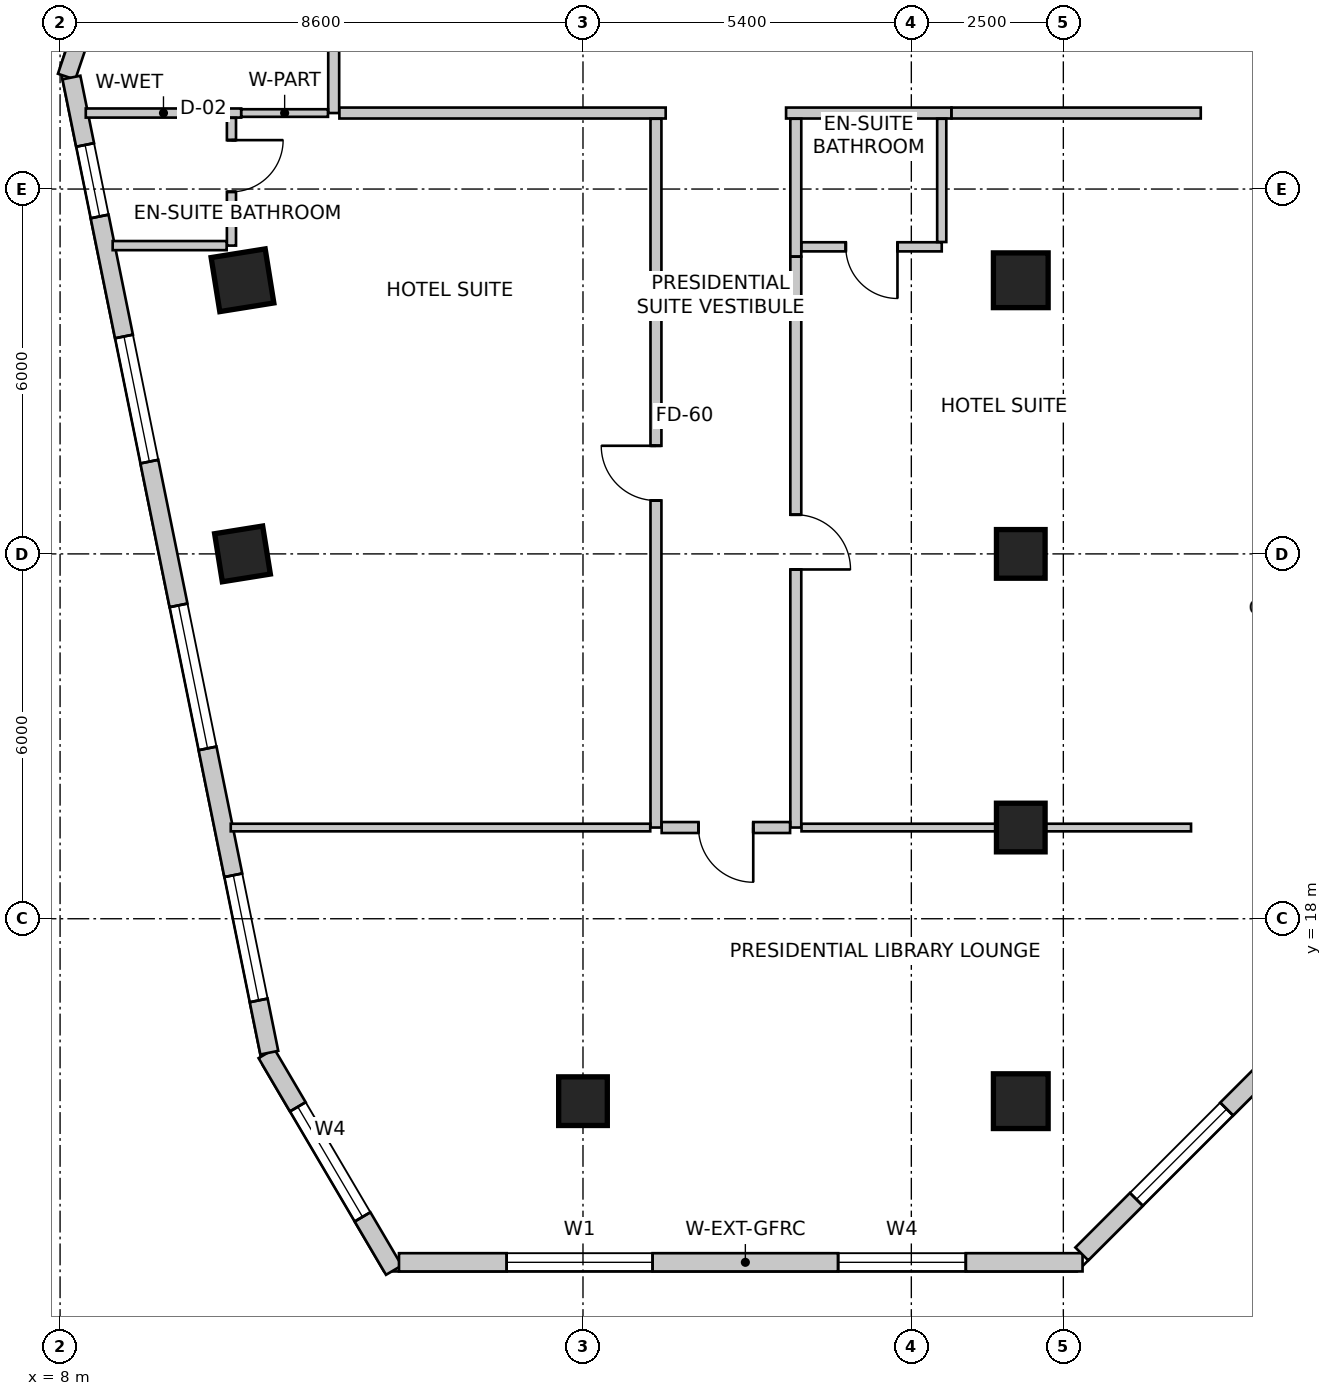
"""IFC4 building model, lengths in metres.
Left out: names, types, materials, properties, quantities, classifications, styles, units other than length and angle.
Written with IfcOpenShell. Run it as: python <this file> out.ifc"""

import sys

from ifc_helpers import new_model, si_unit, direction, frame, frame_2d, origin, origin_2d, place, context, subcontext, project, spatial, rectangle, extrude, source, transform, mapped, element, fill, save


model = new_model("IFC4")
c1 = context("Model", 3, precision=1e-05, world=origin(), true_north=direction((0.0, 1.0)))
c2 = subcontext(c1, "Body", "Model", "MODEL_VIEW")
j1 = project(units=[si_unit("LENGTHUNIT", "METRE"), si_unit("PLANEANGLEUNIT", "RADIAN")], contexts=[c1])
p1 = place(None, origin())
s1 = spatial("IfcSite", under=j1, at=p1, CompositionType="ELEMENT")
p2 = place(p1, origin())
s2 = spatial("IfcBuilding", under=s1, at=p2, CompositionType="ELEMENT")
p3 = place(p2, frame((0.0, 0.0, 168.2)))
s3 = spatial("IfcBuildingStorey", under=s2, at=p3, CompositionType="ELEMENT", Elevation=168.2)
m1 = source(origin(), c2, "Body", "SweptSolid", [
    extrude(rectangle(XDim=0.9, YDim=0.9, at=origin_2d()), origin(), (0.0, 0.0, 1.0), 3.6),
])
p4 = place(p3, frame((11.0, 28.5, 0.0), z_axis=(0.0, 0.0, 1.0), x_axis=(0.158158067254, -0.987413806751, 0.0)))
e1 = element("IfcColumn", 1, at=p4, inside=s3, PredefinedType="COLUMN", context=c2, shape_type="MappedRepresentation", body=[
    mapped(m1, transform((0.0, 0.0, 0.0), scale=1.0)),
])
m2 = source(origin(), c2, "Body", "SweptSolid", [
    extrude(rectangle(XDim=0.8, YDim=0.8, at=origin_2d()), origin(), (0.0, 0.0, 1.0), 3.6),
])
p5 = place(p3, frame((11.0, 24.0, 0.0), z_axis=(0.0, 0.0, 1.0), x_axis=(0.158158067254, -0.987413806751, 0.0)))
e2 = element("IfcColumn", 2, at=p5, inside=s3, PredefinedType="COLUMN", context=c2, shape_type="MappedRepresentation", body=[
    mapped(m2, transform((0.0, 0.0, 0.0), scale=1.0)),
])
p6 = place(p3, frame((23.8, 28.5, 0.0), z_axis=(0.0, 0.0, 1.0), x_axis=(1.0, 0.0, 0.0)))
e3 = element("IfcColumn", 3, at=p6, inside=s3, PredefinedType="COLUMN", context=c2, shape_type="MappedRepresentation", body=[
    mapped(m1, transform((0.0, 0.0, 0.0), scale=1.0)),
])
for number, where, z_axis, x_axis in (
    (4, (23.8, 24.0, 0.0), (0.0, 0.0, 1.0), (1.0, 0.0, 0.0)),
    (5, (23.8, 19.5, 0.0), (0.0, 0.0, 1.0), (1.0, 0.0, 0.0)),
):
    element("IfcColumn", number, at=place(p3, frame(where, z_axis=z_axis, x_axis=x_axis)), inside=s3, PredefinedType="COLUMN", context=c2, shape_type="MappedRepresentation", body=[
        mapped(m2, transform((0.0, 0.0, 0.0), scale=1.0)),
    ])
p7 = place(p3, frame((23.8, 15.0, 0.0), z_axis=(0.0, 0.0, 1.0), x_axis=(1.0, 0.0, 0.0)))
e6 = element("IfcColumn", 6, at=p7, inside=s3, PredefinedType="COLUMN", context=c2, shape_type="MappedRepresentation", body=[
    mapped(m1, transform((0.0, 0.0, 0.0), scale=1.0)),
])
p8 = place(p3, frame((16.6, 15.0, 0.0), z_axis=(0.0, 0.0, 1.0), x_axis=(1.0, 0.0, 0.0)))
e7 = element("IfcColumn", 7, at=p8, inside=s3, PredefinedType="COLUMN", context=c2, shape_type="MappedRepresentation", body=[
    mapped(m2, transform((0.0, 0.0, 0.0), scale=1.0)),
])
p9 = place(p3, frame((11.394, 15.784, 0.0), z_axis=(0.0, 0.0, 1.0), x_axis=(0.50698915279, -0.861952434275, 0.0)))
e8 = element("IfcWall", 8, at=p9, inside=s3, PredefinedType="SOLIDWALL", context=c2, shape_type="SweptSolid", body=[
    extrude(rectangle(XDim=4.134, YDim=0.3, at=frame_2d((2.067, 0.0))), origin(), (0.0, 0.0, 1.0), 3.3),
])
m3 = source(origin(), c2, "Body", "SweptSolid", [
    extrude(rectangle(XDim=2.1, YDim=2.0, at=frame_2d((1.05, 1.0))), frame((0.0, 0.16, 0.0), z_axis=(0.0, -1.0, 0.0), x_axis=(1.0, 0.0, 0.0)), (0.0, 0.0, 1.0), 0.32),
])
p10 = place(p9, frame((1.017, 0.0, 0.85)))
e9 = element("IfcOpeningElement", 9, at=p10, cuts=e8, PredefinedType="OPENING", context=c2, shape_type="MappedRepresentation", body=[
    mapped(m3, transform((0.0, 0.0, 0.0), scale=1.0)),
])
p11 = place(p3, frame((13.574, 12.35, 0.0), z_axis=(0.0, 0.0, 1.0), x_axis=(1.0, 0.0, 0.0)))
e10 = element("IfcWall", 10, at=p11, inside=s3, PredefinedType="SOLIDWALL", context=c2, shape_type="SweptSolid", body=[
    extrude(rectangle(XDim=11.242, YDim=0.3, at=frame_2d((5.621, 0.0))), origin(), (0.0, 0.0, 1.0), 3.3),
])
m4 = source(origin(), c2, "Body", "SweptSolid", [
    extrude(rectangle(XDim=2.4, YDim=2.2, at=frame_2d((1.2, 1.1))), frame((0.0, 0.16, 0.0), z_axis=(0.0, -1.0, 0.0), x_axis=(1.0, 0.0, 0.0)), (0.0, 0.0, 1.0), 0.32),
])
p12 = place(p11, frame((1.771, 0.0, 0.85)))
e11 = element("IfcOpeningElement", 11, at=p12, cuts=e10, PredefinedType="OPENING", context=c2, shape_type="MappedRepresentation", body=[
    mapped(m4, transform((0.0, 0.0, 0.0), scale=1.0)),
])
p13 = place(p11, frame((7.222, 0.0, 0.85)))
e12 = element("IfcOpeningElement", 12, at=p13, cuts=e10, PredefinedType="OPENING", context=c2, shape_type="MappedRepresentation", body=[
    mapped(m3, transform((0.0, 0.0, 0.0), scale=1.0)),
])
p14 = place(p3, frame((24.804, 12.488, 0.0), z_axis=(0.0, 0.0, 1.0), x_axis=(0.70708046583, 0.707133095564, 0.0)))
e13 = element("IfcWall", 13, at=p14, inside=s3, PredefinedType="SOLIDWALL", context=c2, shape_type="SweptSolid", body=[
    extrude(rectangle(XDim=4.639, YDim=0.3, at=frame_2d((2.319, 0.0))), origin(), (0.0, 0.0, 1.0), 3.3),
])
p15 = place(p14, frame((1.269, 0.0, 0.85)))
e14 = element("IfcOpeningElement", 14, at=p15, cuts=e13, PredefinedType="OPENING", context=c2, shape_type="MappedRepresentation", body=[
    mapped(m3, transform((0.0, 0.0, 0.0), scale=1.0)),
])
p16 = place(p3, frame((13.269, 47.134, 0.0), z_axis=(0.0, 0.0, 1.0), x_axis=(-0.319929773322, -0.947441259468, 0.0)))
e15 = element("IfcWall", 15, at=p16, inside=s3, PredefinedType="SOLIDWALL", context=c2, shape_type="SweptSolid", body=[
    extrude(rectangle(XDim=16.134, YDim=0.3, at=frame_2d((8.067, 0.0))), origin(), (0.0, 0.0, 1.0), 3.3),
])
p17 = place(p16, frame((2.276, 0.0, 0.85)))
e16 = element("IfcOpeningElement", 16, at=p17, cuts=e15, PredefinedType="OPENING", context=c2, shape_type="MappedRepresentation", body=[
    mapped(m4, transform((0.0, 0.0, 0.0), scale=1.0)),
])
p18 = place(p16, frame((7.361, 0.0, 0.85)))
e17 = element("IfcOpeningElement", 17, at=p18, cuts=e15, PredefinedType="OPENING", context=c2, shape_type="MappedRepresentation", body=[
    mapped(m3, transform((0.0, 0.0, 0.0), scale=1.0)),
])
p19 = place(p16, frame((12.146, 0.0, 0.85)))
e18 = element("IfcOpeningElement", 18, at=p19, cuts=e15, PredefinedType="OPENING", context=c2, shape_type="MappedRepresentation", body=[
    mapped(m4, transform((0.0, 0.0, 0.0), scale=1.0)),
])
p20 = place(p3, frame((8.187, 31.834, 0.0), z_axis=(0.0, 0.0, 1.0), x_axis=(0.198869838988, -0.980025911464, 0.0)))
e19 = element("IfcWall", 19, at=p20, inside=s3, PredefinedType="SOLIDWALL", context=c2, shape_type="SweptSolid", body=[
    extrude(rectangle(XDim=16.363, YDim=0.3, at=frame_2d((8.182, 0.0))), origin(), (0.0, 0.0, 1.0), 3.3),
])
m5 = source(origin(), c2, "Body", "SweptSolid", [
    extrude(rectangle(XDim=1.2, YDim=1.6, at=frame_2d((0.6, 0.8))), frame((0.0, 0.16, 0.0), z_axis=(0.0, -1.0, 0.0), x_axis=(1.0, 0.0, 0.0)), (0.0, 0.0, 1.0), 0.32),
])
p21 = place(p20, frame((1.131, 0.0, 0.85)))
e20 = element("IfcOpeningElement", 20, at=p21, cuts=e19, PredefinedType="OPENING", context=c2, shape_type="MappedRepresentation", body=[
    mapped(m5, transform((0.0, 0.0, 0.0), scale=1.0)),
])
p22 = place(p20, frame((4.345, 0.0, 0.85)))
e21 = element("IfcOpeningElement", 21, at=p22, cuts=e19, PredefinedType="OPENING", context=c2, shape_type="MappedRepresentation", body=[
    mapped(m3, transform((0.0, 0.0, 0.0), scale=1.0)),
])
p23 = place(p20, frame((8.857, 0.0, 0.85)))
e22 = element("IfcOpeningElement", 22, at=p23, cuts=e19, PredefinedType="OPENING", context=c2, shape_type="MappedRepresentation", body=[
    mapped(m4, transform((0.0, 0.0, 0.0), scale=1.0)),
])
p24 = place(p20, frame((13.386, 0.0, 0.85)))
e23 = element("IfcOpeningElement", 23, at=p24, cuts=e19, PredefinedType="OPENING", context=c2, shape_type="MappedRepresentation", body=[
    mapped(m3, transform((0.0, 0.0, 0.0), scale=1.0)),
])
p25 = place(p3, frame((12.5, 31.25, 0.0), z_axis=(0.0, 0.0, 1.0), x_axis=(0.0, 1.0, 0.0)))
e24 = element("IfcWall", 24, at=p25, inside=s3, PredefinedType="PARTITIONING", context=c2, shape_type="SweptSolid", body=[
    extrude(rectangle(XDim=2.2, YDim=0.18, at=frame_2d((1.1, 0.0))), origin(), (0.0, 0.0, 1.0), 2.885),
])
p26 = place(p3, frame((17.96, 31.25, 0.0), z_axis=(0.0, 0.0, 1.0), x_axis=(-1.0, 0.0, 0.0)))
e25 = element("IfcWall", 25, at=p26, inside=s3, PredefinedType="PARTITIONING", context=c2, shape_type="SweptSolid", body=[
    extrude(rectangle(XDim=5.366, YDim=0.18, at=frame_2d((2.683, 0.0))), origin(), (0.0, 0.0, 1.0), 2.885),
])
p27 = place(p3, frame((22.66, 31.25, 0.0), z_axis=(0.0, 0.0, 1.0), x_axis=(-1.0, 0.0, 0.0)))
e26 = element("IfcWall", 26, at=p27, inside=s3, PredefinedType="PARTITIONING", context=c2, shape_type="SweptSolid", body=[
    extrude(rectangle(XDim=2.72, YDim=0.18, at=frame_2d((1.36, 0.0))), origin(), (0.0, 0.0, 1.0), 2.885),
])
p28 = place(p3, frame((26.76, 31.25, 0.0), z_axis=(0.0, 0.0, 1.0), x_axis=(-1.0, 0.0, 0.0)))
e27 = element("IfcWall", 27, at=p28, inside=s3, PredefinedType="PARTITIONING", context=c2, shape_type="SweptSolid", body=[
    extrude(rectangle(XDim=4.098, YDim=0.18, at=frame_2d((2.049, 0.0))), origin(), (0.0, 0.0, 1.0), 3.3),
])
p29 = place(p3, frame((10.979, 31.25, 0.0), z_axis=(0.0, 0.0, 1.0), x_axis=(-1.0, 0.0, 0.0)))
e28 = element("IfcWall", 28, at=p29, inside=s3, PredefinedType="PARTITIONING", context=c2, shape_type="SweptSolid", body=[
    extrude(rectangle(XDim=2.556, YDim=0.15, at=frame_2d((1.278, 0.0))), origin(), (0.0, 0.0, 1.0), 2.442),
])
p30 = place(p3, frame((12.406, 31.25, 0.0), z_axis=(0.0, 0.0, 1.0), x_axis=(-1.0, 0.0, 0.0)))
e29 = element("IfcWall", 29, at=p30, inside=s3, PredefinedType="PARTITIONING", context=c2, shape_type="SweptSolid", body=[
    extrude(rectangle(XDim=1.426, YDim=0.125, at=frame_2d((0.713, 0.0))), origin(), (0.0, 0.0, 1.0), 2.442),
])
p31 = place(p3, frame((17.8, 19.5, 0.0), z_axis=(0.0, 0.0, 1.0), x_axis=(0.0, 1.0, 0.0)))
e30 = element("IfcWall", 30, at=p31, inside=s3, PredefinedType="PARTITIONING", context=c2, shape_type="SweptSolid", body=[
    extrude(rectangle(XDim=11.656, YDim=0.18, at=frame_2d((5.828, 0.0))), origin(), (0.0, 0.0, 1.0), 2.738),
])
m6 = source(origin(), c2, "Body", "SweptSolid", [
    extrude(rectangle(XDim=0.9, YDim=2.15, at=frame_2d((0.45, 1.075))), frame((0.0, 0.1, 0.0), z_axis=(0.0, -1.0, 0.0), x_axis=(1.0, 0.0, 0.0)), (0.0, 0.0, 1.0), 0.2),
])
p32 = place(p31, frame((5.378, 0.0, 0.0)))
e31 = element("IfcOpeningElement", 31, at=p32, cuts=e30, PredefinedType="OPENING", context=c2, shape_type="MappedRepresentation", body=[
    mapped(m6, transform((0.0, 0.0, 0.0), scale=1.0)),
])
p33 = place(p3, frame((20.1, 31.156, 0.0), z_axis=(0.0, 0.0, 1.0), x_axis=(0.0, -1.0, 0.0)))
e32 = element("IfcWall", 32, at=p33, inside=s3, PredefinedType="PARTITIONING", context=c2, shape_type="SweptSolid", body=[
    extrude(rectangle(XDim=2.266, YDim=0.18, at=frame_2d((1.133, 0.0))), origin(), (0.0, 0.0, 1.0), 2.885),
])
p34 = place(p3, frame((20.1, 28.888, 0.0), z_axis=(0.0, 0.0, 1.0), x_axis=(0.0, -1.0, 0.0)))
e33 = element("IfcWall", 33, at=p34, inside=s3, PredefinedType="PARTITIONING", context=c2, shape_type="SweptSolid", body=[
    extrude(rectangle(XDim=9.388, YDim=0.18, at=frame_2d((4.694, 0.0))), origin(), (0.0, 0.0, 1.0), 2.738),
])
p35 = place(p34, frame((4.244, 0.0, 0.0)))
e34 = element("IfcOpeningElement", 34, at=p35, cuts=e33, PredefinedType="OPENING", context=c2, shape_type="MappedRepresentation", body=[
    mapped(m6, transform((0.0, 0.0, 0.0), scale=1.0)),
])
p36 = place(p3, frame((20.006, 19.5, 0.0), z_axis=(0.0, 0.0, 1.0), x_axis=(-1.0, 0.0, 0.0)))
e35 = element("IfcWall", 35, at=p36, inside=s3, PredefinedType="PARTITIONING", context=c2, shape_type="SweptSolid", body=[
    extrude(rectangle(XDim=2.112, YDim=0.18, at=frame_2d((1.056, 0.0))), origin(), (0.0, 0.0, 1.0), 3.3),
])
p37 = place(p36, frame((0.606, 0.0, 0.0)))
e36 = element("IfcOpeningElement", 36, at=p37, cuts=e35, PredefinedType="OPENING", context=c2, shape_type="MappedRepresentation", body=[
    mapped(m6, transform((0.0, 0.0, 0.0), scale=1.0)),
])
p38 = place(p3, frame((10.819, 31.171, 0.0), z_axis=(0.0, 0.0, 1.0), x_axis=(0.0, -1.0, 0.0)))
e37 = element("IfcWall", 37, at=p38, inside=s3, PredefinedType="PARTITIONING", context=c2, shape_type="SweptSolid", body=[
    extrude(rectangle(XDim=2.101, YDim=0.15, at=frame_2d((1.05, 0.0))), origin(), (0.0, 0.0, 1.0), 2.442),
])
m7 = source(origin(), c2, "Body", "SweptSolid", [
    extrude(rectangle(XDim=0.85, YDim=2.15, at=frame_2d((0.425, 1.075))), frame((0.0, 0.085, 0.0), z_axis=(0.0, -1.0, 0.0), x_axis=(1.0, 0.0, 0.0)), (0.0, 0.0, 1.0), 0.17),
])
p39 = place(p38, frame((0.366, 0.0, 0.0)))
e38 = element("IfcOpeningElement", 38, at=p39, cuts=e37, PredefinedType="OPENING", context=c2, shape_type="MappedRepresentation", body=[
    mapped(m7, transform((0.0, 0.0, 0.0), scale=1.0)),
])
p40 = place(p3, frame((10.74, 29.07, 0.0), z_axis=(0.0, 0.0, 1.0), x_axis=(-1.0, 0.0, 0.0)))
e39 = element("IfcWall", 39, at=p40, inside=s3, PredefinedType="PARTITIONING", context=c2, shape_type="SweptSolid", body=[
    extrude(rectangle(XDim=1.875, YDim=0.15, at=frame_2d((0.937, 0.0))), origin(), (0.0, 0.0, 1.0), 3.3),
])
p41 = place(p3, frame((17.706, 19.5, 0.0), z_axis=(0.0, 0.0, 1.0), x_axis=(-1.0, 0.0, 0.0)))
e40 = element("IfcWall", 40, at=p41, inside=s3, PredefinedType="PARTITIONING", context=c2, shape_type="SweptSolid", body=[
    extrude(rectangle(XDim=6.899, YDim=0.125, at=frame_2d((3.45, 0.0))), origin(), (0.0, 0.0, 1.0), 3.3),
])
p42 = place(p3, frame((22.5, 29.05, 0.0), z_axis=(0.0, 0.0, 1.0), x_axis=(-1.0, 0.0, 0.0)))
e41 = element("IfcWall", 41, at=p42, inside=s3, PredefinedType="PARTITIONING", context=c2, shape_type="SweptSolid", body=[
    extrude(rectangle(XDim=2.306, YDim=0.15, at=frame_2d((1.153, 0.0))), origin(), (0.0, 0.0, 1.0), 2.885),
])
p43 = place(p42, frame((0.728, 0.0, 0.0)))
e42 = element("IfcOpeningElement", 42, at=p43, cuts=e41, PredefinedType="OPENING", context=c2, shape_type="MappedRepresentation", body=[
    mapped(m7, transform((0.0, 0.0, 0.0), scale=1.0)),
])
p44 = place(p3, frame((22.5, 31.156, 0.0), z_axis=(0.0, 0.0, 1.0), x_axis=(0.0, -1.0, 0.0)))
e43 = element("IfcWall", 43, at=p44, inside=s3, PredefinedType="PARTITIONING", context=c2, shape_type="SweptSolid", body=[
    extrude(rectangle(XDim=2.027, YDim=0.15, at=frame_2d((1.014, 0.0))), origin(), (0.0, 0.0, 1.0), 2.885),
])
p45 = place(p3, frame((26.6, 19.5, 0.0), z_axis=(0.0, 0.0, 1.0), x_axis=(-1.0, 0.0, 0.0)))
e44 = element("IfcWall", 44, at=p45, inside=s3, PredefinedType="PARTITIONING", context=c2, shape_type="SweptSolid", body=[
    extrude(rectangle(XDim=6.406, YDim=0.125, at=frame_2d((3.203, 0.0))), origin(), (0.0, 0.0, 1.0), 2.442),
])
m8 = source(origin(), c2, "Body", "SweptSolid", [
    extrude(rectangle(XDim=2.1, YDim=2.0, at=frame_2d((1.05, 1.0))), frame((0.0, -0.015, 0.0), z_axis=(0.0, -1.0, 0.0), x_axis=(1.0, 0.0, 0.0)), (0.0, 0.0, 1.0), 0.06),
])
p46 = place(p10, origin())
e45 = element("IfcWindow", 45, at=p46, inside=s3, PartitioningType="SINGLE_PANEL", PredefinedType="WINDOW", context=c2, shape_type="MappedRepresentation", body=[
    mapped(m8, transform((0.0, 0.0, 0.0), scale=1.0)),
])
fill(e9, e45)
m9 = source(origin(), c2, "Body", "SweptSolid", [
    extrude(rectangle(XDim=2.4, YDim=2.2, at=frame_2d((1.2, 1.1))), frame((0.0, -0.015, 0.0), z_axis=(0.0, -1.0, 0.0), x_axis=(1.0, 0.0, 0.0)), (0.0, 0.0, 1.0), 0.06),
])
p47 = place(p12, origin())
e46 = element("IfcWindow", 46, at=p47, inside=s3, PartitioningType="SINGLE_PANEL", PredefinedType="WINDOW", context=c2, shape_type="MappedRepresentation", body=[
    mapped(m9, transform((0.0, 0.0, 0.0), scale=1.0)),
])
fill(e11, e46)
p48 = place(p13, origin())
e47 = element("IfcWindow", 47, at=p48, inside=s3, PartitioningType="SINGLE_PANEL", PredefinedType="WINDOW", context=c2, shape_type="MappedRepresentation", body=[
    mapped(m8, transform((0.0, 0.0, 0.0), scale=1.0)),
])
fill(e12, e47)
p49 = place(p15, origin())
e48 = element("IfcWindow", 48, at=p49, inside=s3, PartitioningType="SINGLE_PANEL", PredefinedType="WINDOW", context=c2, shape_type="MappedRepresentation", body=[
    mapped(m8, transform((0.0, 0.0, 0.0), scale=1.0)),
])
fill(e14, e48)
m10 = source(origin(), c2, "Body", "SweptSolid", [
    extrude(rectangle(XDim=1.2, YDim=1.6, at=frame_2d((0.6, 0.8))), frame((0.0, -0.015, 0.0), z_axis=(0.0, -1.0, 0.0), x_axis=(1.0, 0.0, 0.0)), (0.0, 0.0, 1.0), 0.06),
])
p50 = place(p21, origin())
e49 = element("IfcWindow", 49, at=p50, inside=s3, PartitioningType="SINGLE_PANEL", PredefinedType="WINDOW", context=c2, shape_type="MappedRepresentation", body=[
    mapped(m10, transform((0.0, 0.0, 0.0), scale=1.0)),
])
fill(e20, e49)
p51 = place(p22, origin())
e50 = element("IfcWindow", 50, at=p51, inside=s3, PartitioningType="SINGLE_PANEL", PredefinedType="WINDOW", context=c2, shape_type="MappedRepresentation", body=[
    mapped(m8, transform((0.0, 0.0, 0.0), scale=1.0)),
])
fill(e21, e50)
p52 = place(p23, origin())
e51 = element("IfcWindow", 51, at=p52, inside=s3, PartitioningType="SINGLE_PANEL", PredefinedType="WINDOW", context=c2, shape_type="MappedRepresentation", body=[
    mapped(m9, transform((0.0, 0.0, 0.0), scale=1.0)),
])
fill(e22, e51)
p53 = place(p24, origin())
e52 = element("IfcWindow", 52, at=p53, inside=s3, PartitioningType="SINGLE_PANEL", PredefinedType="WINDOW", context=c2, shape_type="MappedRepresentation", body=[
    mapped(m8, transform((0.0, 0.0, 0.0), scale=1.0)),
])
fill(e23, e52)
m11 = source(origin(), c2, "Body", "SweptSolid", [
    extrude(rectangle(XDim=0.85, YDim=2.15, at=frame_2d((0.425, 1.075))), frame((0.0, 0.025, 0.0), z_axis=(0.0, -1.0, 0.0), x_axis=(1.0, 0.0, 0.0)), (0.0, 0.0, 1.0), 0.05),
])
p54 = place(p39, origin())
e53 = element("IfcDoor", 53, at=p54, inside=s3, OperationType="SINGLE_SWING_LEFT", PredefinedType="DOOR", context=c2, shape_type="MappedRepresentation", body=[
    mapped(m11, transform((0.0, 0.0, 0.0), scale=1.0)),
])
fill(e38, e53)
m12 = source(origin(), c2, "Body", "SweptSolid", [
    extrude(rectangle(XDim=0.9, YDim=2.15, at=frame_2d((0.45, 1.075))), frame((0.0, 0.025, 0.0), z_axis=(0.0, -1.0, 0.0), x_axis=(1.0, 0.0, 0.0)), (0.0, 0.0, 1.0), 0.05),
])
p55 = place(p32, origin())
e54 = element("IfcDoor", 54, at=p55, inside=s3, OperationType="SINGLE_SWING_RIGHT", PredefinedType="DOOR", context=c2, shape_type="MappedRepresentation", body=[
    mapped(m12, transform((0.0, 0.0, 0.0), scale=1.0)),
])
fill(e31, e54)
p56 = place(p43, origin())
e55 = element("IfcDoor", 55, at=p56, inside=s3, OperationType="SINGLE_SWING_LEFT", PredefinedType="DOOR", context=c2, shape_type="MappedRepresentation", body=[
    mapped(m11, transform((0.0, 0.0, 0.0), scale=1.0)),
])
fill(e42, e55)
p57 = place(p35, origin())
e56 = element("IfcDoor", 56, at=p57, inside=s3, OperationType="SINGLE_SWING_RIGHT", PredefinedType="DOOR", context=c2, shape_type="MappedRepresentation", body=[
    mapped(m12, transform((0.0, 0.0, 0.0), scale=1.0)),
])
fill(e34, e56)
m13 = source(origin(), c2, "Body", "SweptSolid", [
    extrude(rectangle(XDim=0.9, YDim=2.15, at=frame_2d((0.45, 1.075))), frame((0.0, 0.025, 0.0), z_axis=(0.0, -1.0, 0.0), x_axis=(1.0, 0.0, 0.0)), (0.0, 0.0, 1.0), 0.05),
])
p58 = place(p37, origin())
e57 = element("IfcDoor", 57, at=p58, inside=s3, OperationType="SINGLE_SWING_LEFT", PredefinedType="DOOR", context=c2, shape_type="MappedRepresentation", body=[
    mapped(m13, transform((0.0, 0.0, 0.0), scale=1.0)),
])
fill(e36, e57)
save(model, sys.argv[1])
